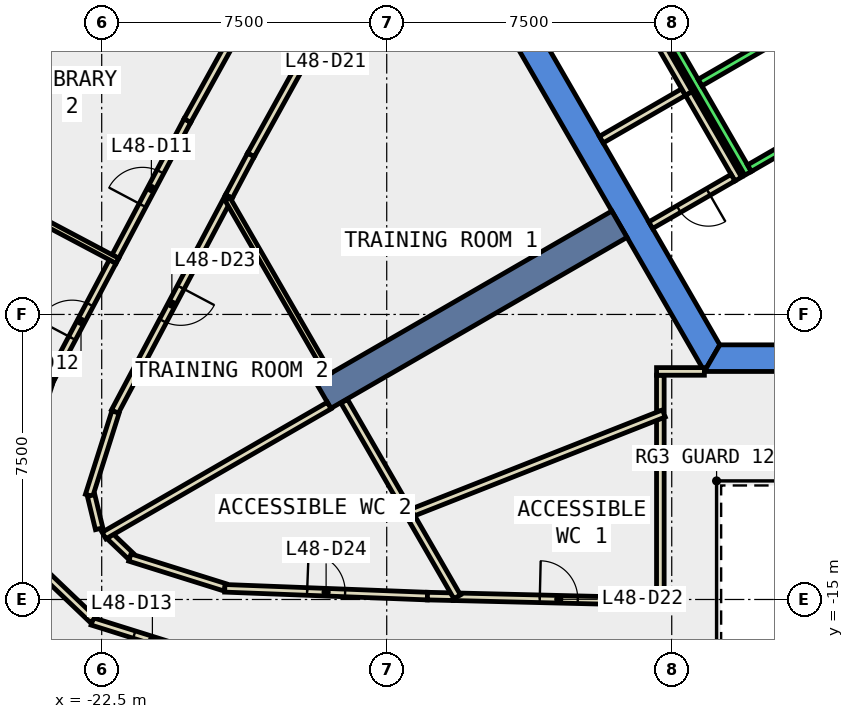
"""IFC4 building model, lengths in metres.
Left out: names, types, materials, properties, quantities, classifications, styles, units other than length and angle.
Written with IfcOpenShell. Run it as: python <this file> out.ifc"""

import sys

from ifc_helpers import new_model, si_unit, direction, frame, frame_2d, origin, place, context, subcontext, project, spatial, polyline, rectangle, outline, extrude, element, fill, save


model = new_model("IFC4")
c1 = context("Model", 3, precision=1e-05, world=origin(), true_north=direction((0.0, 1.0)))
c2 = subcontext(c1, "Body", "Model", "MODEL_VIEW")
j1 = project(units=[si_unit("LENGTHUNIT", "METRE"), si_unit("PLANEANGLEUNIT", "RADIAN")], contexts=[c1])
p1 = place(None, origin())
s1 = spatial("IfcSite", under=j1, at=p1, CompositionType="ELEMENT")
p2 = place(p1, origin())
s2 = spatial("IfcBuilding", under=s1, at=p2, CompositionType="ELEMENT")
p3 = place(p2, frame((0.0, 0.0, 215.0)))
s3 = spatial("IfcBuildingStorey", under=s2, at=p3, CompositionType="ELEMENT", Elevation=215.0)
p4 = place(p3, frame((0.0, 0.0, -0.4)))
e1 = element("IfcWall", 1, at=p4, inside=s3, PredefinedType="SHEAR", context=c2, shape_type="SweptSolid", body=[
    extrude(outline(polyline([(-13.279, 2.5), (-6.64, -9.0), (-6.235, -8.3), (-12.471, 2.5), (-13.279, 2.5)])), origin(), (0.0, 0.0, 1.0), 4.2),
])
p5 = place(p3, frame((0.0, 0.0, -0.4)))
e2 = element("IfcWall", 2, at=p5, inside=s3, PredefinedType="SHEAR", context=c2, shape_type="SweptSolid", body=[
    extrude(outline(polyline([(3.75, -9.0), (3.75, -8.3), (-6.235, -8.3), (-6.64, -9.0), (3.75, -9.0)])), origin(), (0.0, 0.0, 1.0), 4.2),
])
p6 = place(p3, frame((-8.877, -5.125, -0.4), z_axis=(0.0, 0.0, 1.0), x_axis=(-0.866017533419, -0.500013631625, 0.0)))
e3 = element("IfcWall", 3, at=p6, inside=s3, PredefinedType="SHEAR", context=c2, shape_type="SweptSolid", body=[
    extrude(rectangle(XDim=9.0, YDim=0.8, at=frame_2d((4.5, 0.0))), origin(), (0.0, 0.0, 1.0), 4.2),
])
p7 = place(p3, frame((-14.652, 3.783, 0.0), z_axis=(0.0, 0.0, 1.0), x_axis=(-0.484249955458, -0.874929700398, 0.0)))
e4 = element("IfcWall", 4, at=p7, inside=s3, PredefinedType="PARTITIONING", context=c2, shape_type="SweptSolid", body=[
    extrude(rectangle(XDim=8.099, YDim=0.2, at=frame_2d((4.049, 0.0))), origin(), (0.0, 0.0, 1.0), 3.8),
])
p8 = place(p7, frame((3.55, 0.0, 0.0)))
e5 = element("IfcOpeningElement", 5, at=p8, cuts=e4, PredefinedType="OPENING", context=c2, shape_type="SweptSolid", body=[
    extrude(rectangle(XDim=1.0, YDim=2.1, at=frame_2d((0.5, 1.05))), frame((0.0, 0.11, 0.0), z_axis=(0.0, -1.0, 0.0), x_axis=(1.0, 0.0, 0.0)), (0.0, 0.0, 1.0), 0.22),
])
p9 = place(p3, frame((-18.574, -3.303, 0.0), z_axis=(0.0, 0.0, 1.0), x_axis=(-0.468458328651, -0.883485593724, 0.0)))
e6 = element("IfcWall", 6, at=p9, inside=s3, PredefinedType="PARTITIONING", context=c2, shape_type="SweptSolid", body=[
    extrude(rectangle(XDim=1.238, YDim=0.2, at=frame_2d((0.619, 0.0))), origin(), (0.0, 0.0, 1.0), 3.8),
])
p10 = place(p3, frame((-13.246, -14.927, 0.0), z_axis=(0.0, 0.0, 1.0), x_axis=(0.999708107757, -0.024159869312, 0.0)))
e7 = element("IfcWall", 7, at=p10, inside=s3, PredefinedType="PARTITIONING", context=c2, shape_type="SweptSolid", body=[
    extrude(rectangle(XDim=5.548, YDim=0.2, at=frame_2d((2.774, 0.0))), origin(), (0.0, 0.0, 1.0), 3.8),
])
p11 = place(p10, frame((2.274, 0.0, 0.0)))
e8 = element("IfcOpeningElement", 8, at=p11, cuts=e7, PredefinedType="OPENING", context=c2, shape_type="SweptSolid", body=[
    extrude(rectangle(XDim=1.0, YDim=2.1, at=frame_2d((0.5, 1.05))), frame((0.0, 0.11, 0.0), z_axis=(0.0, -1.0, 0.0), x_axis=(1.0, 0.0, 0.0)), (0.0, 0.0, 1.0), 0.22),
])
p12 = place(p3, frame((-19.154, -4.397, 0.0), z_axis=(0.0, 0.0, 1.0), x_axis=(-0.468118749105, -0.883665568378, 0.0)))
e9 = element("IfcWall", 9, at=p12, inside=s3, PredefinedType="PARTITIONING", context=c2, shape_type="SweptSolid", body=[
    extrude(rectangle(XDim=6.409, YDim=0.2, at=frame_2d((3.204, 0.0))), origin(), (0.0, 0.0, 1.0), 3.8),
])
p13 = place(p12, frame((2.704, 0.0, 0.0)))
e10 = element("IfcOpeningElement", 10, at=p13, cuts=e9, PredefinedType="OPENING", context=c2, shape_type="SweptSolid", body=[
    extrude(rectangle(XDim=1.0, YDim=2.1, at=frame_2d((0.5, 1.05))), frame((0.0, 0.11, 0.0), z_axis=(0.0, -1.0, 0.0), x_axis=(1.0, 0.0, 0.0)), (0.0, 0.0, 1.0), 0.22),
])
p14 = place(p3, frame((-22.137, -10.067, 0.0), z_axis=(0.0, 0.0, 1.0), x_axis=(-0.302262657712, -0.953224677478, 0.0)))
e11 = element("IfcWall", 11, at=p14, inside=s3, PredefinedType="PARTITIONING", context=c2, shape_type="SweptSolid", body=[
    extrude(rectangle(XDim=2.303, YDim=0.2, at=frame_2d((1.151, 0.0))), origin(), (0.0, 0.0, 1.0), 3.8),
])
p15 = place(p3, frame((-22.779, -12.264, 0.0), z_axis=(0.0, 0.0, 1.0), x_axis=(0.2356388299, -0.971840697771, 0.0)))
e12 = element("IfcWall", 12, at=p15, inside=s3, PredefinedType="PARTITIONING", context=c2, shape_type="SweptSolid", body=[
    extrude(rectangle(XDim=0.9, YDim=0.2, at=frame_2d((0.45, 0.0))), origin(), (0.0, 0.0, 1.0), 3.8),
])
p16 = place(p3, frame((-22.281, -13.337, 0.0), z_axis=(0.0, 0.0, 1.0), x_axis=(0.723443840005, -0.690383234413, 0.0)))
e13 = element("IfcWall", 13, at=p16, inside=s3, PredefinedType="PARTITIONING", context=c2, shape_type="SweptSolid", body=[
    extrude(rectangle(XDim=0.753, YDim=0.2, at=frame_2d((0.376, 0.0))), origin(), (0.0, 0.0, 1.0), 3.8),
])
p17 = place(p3, frame((-21.759, -13.896, 0.0), z_axis=(0.0, 0.0, 1.0), x_axis=(0.954254371194, -0.298995978328, 0.0)))
e14 = element("IfcWall", 14, at=p17, inside=s3, PredefinedType="PARTITIONING", context=c2, shape_type="SweptSolid", body=[
    extrude(rectangle(XDim=2.622, YDim=0.2, at=frame_2d((1.311, 0.0))), origin(), (0.0, 0.0, 1.0), 3.8),
])
p18 = place(p3, frame((-19.261, -14.706, 0.0), z_axis=(0.0, 0.0, 1.0), x_axis=(0.999262930749, -0.038387435847, 0.0)))
e15 = element("IfcWall", 15, at=p18, inside=s3, PredefinedType="PARTITIONING", context=c2, shape_type="SweptSolid", body=[
    extrude(rectangle(XDim=5.336, YDim=0.2, at=frame_2d((2.668, 0.0))), origin(), (0.0, 0.0, 1.0), 3.8),
])
p19 = place(p18, frame((2.168, 0.0, 0.0)))
e16 = element("IfcOpeningElement", 16, at=p19, cuts=e15, PredefinedType="OPENING", context=c2, shape_type="SweptSolid", body=[
    extrude(rectangle(XDim=1.0, YDim=2.1, at=frame_2d((0.5, 1.05))), frame((0.0, 0.11, 0.0), z_axis=(0.0, -1.0, 0.0), x_axis=(1.0, 0.0, 0.0)), (0.0, 0.0, 1.0), 0.22),
])
p20 = place(p3, frame((-13.929, -14.911, 0.0), z_axis=(0.0, 0.0, 1.0), x_axis=(0.999721713829, -0.023590144123, 0.0)))
e17 = element("IfcWall", 17, at=p20, inside=s3, PredefinedType="PARTITIONING", context=c2, shape_type="SweptSolid", body=[
    extrude(rectangle(XDim=0.683, YDim=0.2, at=frame_2d((0.342, 0.0))), origin(), (0.0, 0.0, 1.0), 3.8),
])
p21 = place(p3, frame((-22.14, -5.976, 0.0), z_axis=(0.0, 0.0, 1.0), x_axis=(0.467979143965, 0.883739509592, 0.0)))
e18 = element("IfcWall", 18, at=p21, inside=s3, PredefinedType="PARTITIONING", context=c2, shape_type="SweptSolid", body=[
    extrude(rectangle(XDim=4.049, YDim=0.2, at=frame_2d((2.024, 0.0))), origin(), (0.0, 0.0, 1.0), 3.8),
])
p22 = place(p21, frame((1.524, 0.0, 0.0)))
e19 = element("IfcOpeningElement", 19, at=p22, cuts=e18, PredefinedType="OPENING", context=c2, shape_type="SweptSolid", body=[
    extrude(rectangle(XDim=1.0, YDim=2.1, at=frame_2d((0.5, 1.05))), frame((0.0, 0.11, 0.0), z_axis=(0.0, -1.0, 0.0), x_axis=(1.0, 0.0, 0.0)), (0.0, 0.0, 1.0), 0.22),
])
p23 = place(p3, frame((-20.245, -2.398, 0.0), z_axis=(0.0, 0.0, 1.0), x_axis=(0.484328424129, 0.874886265511, 0.0)))
e20 = element("IfcWall", 20, at=p23, inside=s3, PredefinedType="PARTITIONING", context=c2, shape_type="SweptSolid", body=[
    extrude(rectangle(XDim=3.991, YDim=0.2, at=frame_2d((1.996, 0.0))), origin(), (0.0, 0.0, 1.0), 3.8),
])
p24 = place(p3, frame((-23.878, -9.256, 0.0), z_axis=(0.0, 0.0, 1.0), x_axis=(0.46795384568, 0.883752905689, 0.0)))
e21 = element("IfcWall", 21, at=p24, inside=s3, PredefinedType="PARTITIONING", context=c2, shape_type="SweptSolid", body=[
    extrude(rectangle(XDim=3.562, YDim=0.2, at=frame_2d((1.781, 0.0))), origin(), (0.0, 0.0, 1.0), 3.8),
])
p25 = place(p24, frame((1.281, 0.0, 0.0)))
e22 = element("IfcOpeningElement", 22, at=p25, cuts=e21, PredefinedType="OPENING", context=c2, shape_type="SweptSolid", body=[
    extrude(rectangle(XDim=1.0, YDim=2.1, at=frame_2d((0.5, 1.05))), frame((0.0, 0.11, 0.0), z_axis=(0.0, -1.0, 0.0), x_axis=(1.0, 0.0, 0.0)), (0.0, 0.0, 1.0), 0.22),
])
p26 = place(p3, frame((-19.583, -16.569, 0.0), z_axis=(0.0, 0.0, 1.0), x_axis=(-0.954238750745, 0.299045826884, 0.0)))
e23 = element("IfcWall", 23, at=p26, inside=s3, PredefinedType="PARTITIONING", context=c2, shape_type="SweptSolid", body=[
    extrude(rectangle(XDim=3.318, YDim=0.2, at=frame_2d((1.659, 0.0))), origin(), (0.0, 0.0, 1.0), 3.8),
])
p27 = place(p26, frame((1.159, 0.0, 0.0)))
e24 = element("IfcOpeningElement", 24, at=p27, cuts=e23, PredefinedType="OPENING", context=c2, shape_type="SweptSolid", body=[
    extrude(rectangle(XDim=1.0, YDim=2.1, at=frame_2d((0.5, 1.05))), frame((0.0, 0.11, 0.0), z_axis=(0.0, -1.0, 0.0), x_axis=(1.0, 0.0, 0.0)), (0.0, 0.0, 1.0), 0.22),
])
p28 = place(p3, frame((-22.726, -15.538, 0.0), z_axis=(0.0, 0.0, 1.0), x_axis=(-0.723967420116, 0.689834164571, 0.0)))
e25 = element("IfcWall", 25, at=p28, inside=s3, PredefinedType="PARTITIONING", context=c2, shape_type="SweptSolid", body=[
    extrude(rectangle(XDim=2.282, YDim=0.2, at=frame_2d((1.141, 0.0))), origin(), (0.0, 0.0, 1.0), 3.8),
])
p29 = place(p3, frame((-24.805, -12.194, 0.0), z_axis=(0.0, 0.0, 1.0), x_axis=(0.302200639646, 0.953244340868, 0.0)))
e26 = element("IfcWall", 26, at=p29, inside=s3, PredefinedType="PARTITIONING", context=c2, shape_type="SweptSolid", body=[
    extrude(rectangle(XDim=3.004, YDim=0.2, at=frame_2d((1.502, 0.0))), origin(), (0.0, 0.0, 1.0), 3.8),
])
p30 = place(p3, frame((-7.188, -1.65, 0.0), z_axis=(0.0, 0.0, 1.0), x_axis=(-0.866022959057, -0.500004234368, 0.0)))
e27 = element("IfcWall", 27, at=p30, inside=s3, PredefinedType="PARTITIONING", context=c2, shape_type="SweptSolid", body=[
    extrude(rectangle(XDim=2.5, YDim=0.2, at=frame_2d((1.25, 0.0))), origin(), (0.0, 0.0, 1.0), 3.8),
])
p31 = place(p3, frame((-9.751, 2.99, 0.0), z_axis=(0.0, 0.0, 1.0), x_axis=(0.499955951776, -0.866050833545, 0.0)))
e28 = element("IfcWall", 28, at=p31, inside=s3, PredefinedType="PARTITIONING", context=c2, shape_type="SweptSolid", body=[
    extrude(rectangle(XDim=5.4, YDim=0.2, at=frame_2d((2.7, 0.0))), origin(), (0.0, 0.0, 1.0), 3.8),
])
p32 = place(p3, frame((-7.051, -1.687, 0.0), z_axis=(0.0, 0.0, 1.0), x_axis=(0.500128937424, -0.865950948929, 0.0)))
e29 = element("IfcWall", 29, at=p32, inside=s3, PredefinedType="PARTITIONING", context=c2, shape_type="SweptSolid", body=[
    extrude(rectangle(XDim=2.599, YDim=0.2, at=frame_2d((1.3, 0.0))), origin(), (0.0, 0.0, 1.0), 3.8),
])
p33 = place(p3, frame((-5.888, -3.902, 0.0), z_axis=(0.0, 0.0, 1.0), x_axis=(-0.866022959057, -0.500004234368, 0.0)))
e30 = element("IfcWall", 30, at=p33, inside=s3, PredefinedType="PARTITIONING", context=c2, shape_type="SweptSolid", body=[
    extrude(rectangle(XDim=2.5, YDim=0.2, at=frame_2d((1.25, 0.0))), origin(), (0.0, 0.0, 1.0), 3.8),
])
p34 = place(p33, frame((0.75, 0.0, 0.0)))
e31 = element("IfcOpeningElement", 31, at=p34, cuts=e30, PredefinedType="OPENING", context=c2, shape_type="SweptSolid", body=[
    extrude(rectangle(XDim=0.9, YDim=2.1, at=frame_2d((0.45, 1.05))), frame((0.0, 0.11, 0.0), z_axis=(0.0, -1.0, 0.0), x_axis=(1.0, 0.0, 0.0)), (0.0, 0.0, 1.0), 0.22),
])
p35 = place(p3, frame((-7.8, -10.041, 0.0), z_axis=(0.0, 0.0, 1.0), x_axis=(0.0, 1.0, 0.0)))
e32 = element("IfcWall", 32, at=p35, inside=s3, PredefinedType="PARTITIONING", context=c2, shape_type="SweptSolid", body=[
    extrude(rectangle(XDim=0.942, YDim=0.2, at=frame_2d((0.471, 0.0))), origin(), (0.0, 0.0, 1.0), 3.8),
])
p36 = place(p3, frame((-7.9, -8.999, 0.0), z_axis=(0.0, 0.0, 1.0), x_axis=(1.0, 0.0, 0.0)))
e33 = element("IfcWall", 33, at=p36, inside=s3, PredefinedType="PARTITIONING", context=c2, shape_type="SweptSolid", body=[
    extrude(rectangle(XDim=1.259, YDim=0.2, at=frame_2d((0.629, 0.0))), origin(), (0.0, 0.0, 1.0), 3.8),
])
p37 = place(p3, frame((-7.8, -14.959, 0.0), z_axis=(0.0, 0.0, 1.0), x_axis=(0.0, 1.0, 0.0)))
e34 = element("IfcWall", 34, at=p37, inside=s3, PredefinedType="PARTITIONING", context=c2, shape_type="SweptSolid", body=[
    extrude(rectangle(XDim=4.718, YDim=0.2, at=frame_2d((2.359, 0.0))), origin(), (0.0, 0.0, 1.0), 3.8),
])
p38 = place(p3, frame((-7.707, -10.105, 0.0), z_axis=(0.0, 0.0, 1.0), x_axis=(-0.930316800812, -0.36675693603, 0.0)))
e35 = element("IfcWall", 35, at=p38, inside=s3, PredefinedType="PARTITIONING", context=c2, shape_type="SweptSolid", body=[
    extrude(rectangle(XDim=7.302, YDim=0.2, at=frame_2d((3.651, 0.0))), origin(), (0.0, 0.0, 1.0), 3.8),
])
p39 = place(p3, frame((-16.525, -9.079, 0.0), z_axis=(0.0, 0.0, 1.0), x_axis=(-0.499943228252, 0.866058178487, 0.0)))
e36 = element("IfcWall", 36, at=p39, inside=s3, PredefinedType="PARTITIONING", context=c2, shape_type="SweptSolid", body=[
    extrude(rectangle(XDim=5.329, YDim=0.15, at=frame_2d((2.664, 0.0))), origin(), (0.0, 0.0, 1.0), 3.8),
])
p40 = place(p3, frame((-14.457, -12.66, 0.0), z_axis=(0.0, 0.0, 1.0), x_axis=(-0.49997268395, 0.866041174139, 0.0)))
e37 = element("IfcWall", 37, at=p40, inside=s3, PredefinedType="PARTITIONING", context=c2, shape_type="SweptSolid", body=[
    extrude(rectangle(XDim=3.322, YDim=0.2, at=frame_2d((1.661, 0.0))), origin(), (0.0, 0.0, 1.0), 3.8),
])
p41 = place(p3, frame((-13.146, -14.93, 0.0), z_axis=(0.0, 0.0, 1.0), x_axis=(-0.500086091327, 0.865975693228, 0.0)))
e38 = element("IfcWall", 38, at=p41, inside=s3, PredefinedType="PARTITIONING", context=c2, shape_type="SweptSolid", body=[
    extrude(rectangle(XDim=2.421, YDim=0.2, at=frame_2d((1.211, 0.0))), origin(), (0.0, 0.0, 1.0), 3.8),
])
p42 = place(p3, frame((-16.514, -9.897, 0.0), z_axis=(0.0, 0.0, 1.0), x_axis=(-0.866041209536, -0.499972622635, 0.0)))
e39 = element("IfcWall", 39, at=p42, inside=s3, PredefinedType="PARTITIONING", context=c2, shape_type="SweptSolid", body=[
    extrude(rectangle(XDim=6.843, YDim=0.2, at=frame_2d((3.421, 0.0))), origin(), (0.0, 0.0, 1.0), 3.8),
])
p43 = place(p3, frame((-22.087, -6.089, 0.0), z_axis=(0.0, 0.0, 1.0), x_axis=(-0.883611647524, 0.468220521079, 0.0)))
e40 = element("IfcWall", 40, at=p43, inside=s3, PredefinedType="PARTITIONING", context=c2, shape_type="SweptSolid", body=[
    extrude(rectangle(XDim=6.1, YDim=0.15, at=frame_2d((3.05, 0.0))), origin(), (0.0, 0.0, 1.0), 3.8),
])
p44 = place(p3, frame((-23.774, -9.273, 0.0), z_axis=(0.0, 0.0, 1.0), x_axis=(-0.922217762148, 0.386670918454, 0.0)))
e41 = element("IfcWall", 41, at=p44, inside=s3, PredefinedType="PARTITIONING", context=c2, shape_type="SweptSolid", body=[
    extrude(rectangle(XDim=4.805, YDim=0.15, at=frame_2d((2.402, 0.0))), origin(), (0.0, 0.0, 1.0), 3.8),
])
p45 = place(p3, frame((-5.94, 2.188, 0.0), z_axis=(0.0, 0.0, 1.0), x_axis=(0.500034260056, -0.866005622828, 0.0)))
e42 = element("IfcWall", 42, at=p45, inside=s3, PredefinedType="STANDARD", context=c2, shape_type="SweptSolid", body=[
    extrude(rectangle(XDim=5.399, YDim=0.2, at=frame_2d((2.7, 0.0))), origin(), (0.0, 0.0, 1.0), 3.8),
])
p46 = place(p45, frame((3.075, 0.0, 0.0)))
e43 = element("IfcOpeningElement", 43, at=p46, cuts=e42, PredefinedType="OPENING", context=c2, shape_type="SweptSolid", body=[
    extrude(rectangle(XDim=1.1, YDim=2.1, at=frame_2d((0.55, 1.05))), frame((0.0, 0.11, 0.0), z_axis=(0.0, -1.0, 0.0), x_axis=(1.0, 0.0, 0.0)), (0.0, 0.0, 1.0), 0.22),
])
p47 = place(p45, frame((1.225, 0.0, 0.0)))
e44 = element("IfcOpeningElement", 44, at=p47, cuts=e42, PredefinedType="OPENING", context=c2, shape_type="SweptSolid", body=[
    extrude(rectangle(XDim=1.1, YDim=2.1, at=frame_2d((0.55, 1.05))), frame((0.0, 0.11, 0.0), z_axis=(0.0, -1.0, 0.0), x_axis=(1.0, 0.0, 0.0)), (0.0, 0.0, 1.0), 0.22),
])
p48 = place(p3, frame((-8.192, 0.888, 0.0), z_axis=(0.0, 0.0, 1.0), x_axis=(0.500034260056, -0.866005622828, 0.0)))
e45 = element("IfcWall", 45, at=p48, inside=s3, PredefinedType="STANDARD", context=c2, shape_type="SweptSolid", body=[
    extrude(rectangle(XDim=5.399, YDim=0.2, at=frame_2d((2.7, 0.0))), origin(), (0.0, 0.0, 1.0), 3.8),
])
p49 = place(p3, frame((-4.677, -0.2, 0.0), z_axis=(0.0, 0.0, 1.0), x_axis=(-0.865973769406, -0.500089422704, 0.0)))
e46 = element("IfcWall", 46, at=p49, inside=s3, PredefinedType="STANDARD", context=c2, shape_type="SweptSolid", body=[
    extrude(rectangle(XDim=2.399, YDim=0.2, at=frame_2d((1.2, 0.0))), origin(), (0.0, 0.0, 1.0), 3.8),
])
p50 = place(p3, frame((-3.377, -2.452, 0.0), z_axis=(0.0, 0.0, 1.0), x_axis=(-0.865955154139, -0.50012165622, 0.0)))
e47 = element("IfcWall", 47, at=p50, inside=s3, PredefinedType="STANDARD", context=c2, shape_type="SweptSolid", body=[
    extrude(rectangle(XDim=2.4, YDim=0.2, at=frame_2d((1.2, 0.0))), origin(), (0.0, 0.0, 1.0), 3.8),
])
p51 = place(p22, origin())
e48 = element("IfcDoor", 48, at=p51, inside=s3, OperationType="SINGLE_SWING_LEFT", PredefinedType="DOOR", context=c2, shape_type="SweptSolid", body=[
    extrude(rectangle(XDim=1.0, YDim=2.1, at=frame_2d((0.5, 1.05))), frame((0.0, 0.025, 0.0), z_axis=(0.0, -1.0, 0.0), x_axis=(1.0, 0.0, 0.0)), (0.0, 0.0, 1.0), 0.05),
])
fill(e19, e48)
p52 = place(p25, origin())
e49 = element("IfcDoor", 49, at=p52, inside=s3, OperationType="SINGLE_SWING_LEFT", PredefinedType="DOOR", context=c2, shape_type="SweptSolid", body=[
    extrude(rectangle(XDim=1.0, YDim=2.1, at=frame_2d((0.5, 1.05))), frame((0.0, 0.025, 0.0), z_axis=(0.0, -1.0, 0.0), x_axis=(1.0, 0.0, 0.0)), (0.0, 0.0, 1.0), 0.05),
])
fill(e22, e49)
p53 = place(p27, origin())
e50 = element("IfcDoor", 50, at=p53, inside=s3, OperationType="SINGLE_SWING_RIGHT", PredefinedType="DOOR", context=c2, shape_type="SweptSolid", body=[
    extrude(rectangle(XDim=1.0, YDim=2.1, at=frame_2d((0.5, 1.05))), frame((0.0, 0.025, 0.0), z_axis=(0.0, -1.0, 0.0), x_axis=(1.0, 0.0, 0.0)), (0.0, 0.0, 1.0), 0.05),
])
fill(e24, e50)
p54 = place(p11, origin())
e51 = element("IfcDoor", 51, at=p54, inside=s3, OperationType="SINGLE_SWING_LEFT", PredefinedType="DOOR", context=c2, shape_type="SweptSolid", body=[
    extrude(rectangle(XDim=1.0, YDim=2.1, at=frame_2d((0.5, 1.05))), frame((0.0, 0.025, 0.0), z_axis=(0.0, -1.0, 0.0), x_axis=(1.0, 0.0, 0.0)), (0.0, 0.0, 1.0), 0.05),
])
fill(e8, e51)
p55 = place(p13, origin())
e52 = element("IfcDoor", 52, at=p55, inside=s3, OperationType="SINGLE_SWING_LEFT", PredefinedType="DOOR", context=c2, shape_type="SweptSolid", body=[
    extrude(rectangle(XDim=1.0, YDim=2.1, at=frame_2d((0.5, 1.05))), frame((0.0, 0.025, 0.0), z_axis=(0.0, -1.0, 0.0), x_axis=(1.0, 0.0, 0.0)), (0.0, 0.0, 1.0), 0.05),
])
fill(e10, e52)
p56 = place(p19, origin())
e53 = element("IfcDoor", 53, at=p56, inside=s3, OperationType="SINGLE_SWING_LEFT", PredefinedType="DOOR", context=c2, shape_type="SweptSolid", body=[
    extrude(rectangle(XDim=1.0, YDim=2.1, at=frame_2d((0.5, 1.05))), frame((0.0, 0.025, 0.0), z_axis=(0.0, -1.0, 0.0), x_axis=(1.0, 0.0, 0.0)), (0.0, 0.0, 1.0), 0.05),
])
fill(e16, e53)
p57 = place(p34, origin())
e54 = element("IfcDoor", 54, at=p57, inside=s3, OperationType="SINGLE_SWING_RIGHT", PredefinedType="DOOR", context=c2, shape_type="SweptSolid", body=[
    extrude(rectangle(XDim=0.9, YDim=2.1, at=frame_2d((0.45, 1.05))), frame((0.0, 0.025, 0.0), z_axis=(0.0, -1.0, 0.0), x_axis=(1.0, 0.0, 0.0)), (0.0, 0.0, 1.0), 0.05),
])
fill(e31, e54)
save(model, sys.argv[1])
